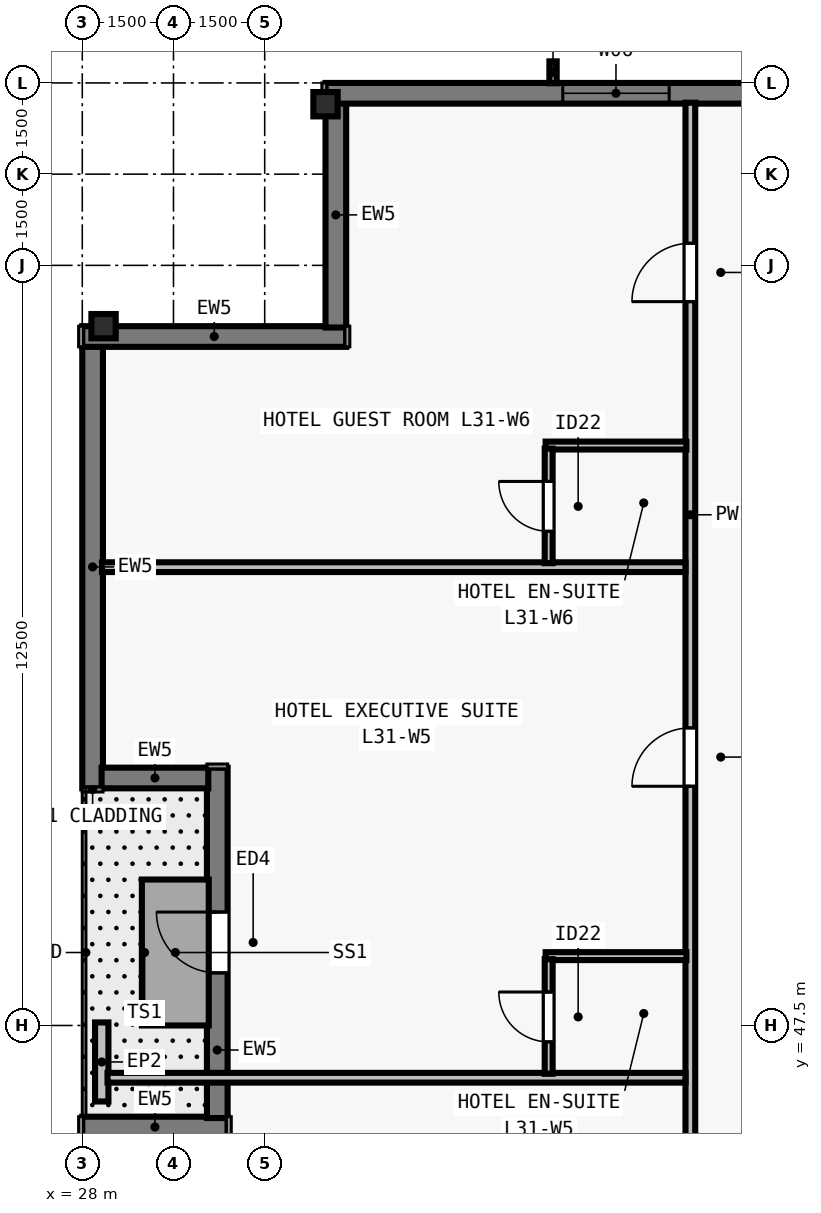
"""IFC4 building model, lengths in metres.
Left out: names, types, materials, properties, quantities, classifications, styles, units other than length and angle.
Written with IfcOpenShell. Run it as: python <this file> out.ifc"""

import sys

from ifc_helpers import new_model, si_unit, direction, frame, frame_2d, origin, origin_2d, place, context, subcontext, project, spatial, rectangle, i_section, extrude, element, fill, save


model = new_model("IFC4")
c1 = context("Model", 3, precision=1e-05, world=origin(), true_north=direction((0.0, 1.0)))
c2 = subcontext(c1, "Body", "Model", "MODEL_VIEW")
j1 = project(units=[si_unit("LENGTHUNIT", "METRE"), si_unit("PLANEANGLEUNIT", "RADIAN")], contexts=[c1])
p1 = place(None, origin())
s1 = spatial("IfcSite", under=j1, at=p1, CompositionType="ELEMENT")
p2 = place(p1, origin())
s2 = spatial("IfcBuilding", under=s1, at=p2, CompositionType="ELEMENT")
p3 = place(p2, frame((0.0, 0.0, 116.5)))
s3 = spatial("IfcBuildingStorey", under=s2, at=p3, CompositionType="ELEMENT", Elevation=116.5)
for number, where, z_axis, x_axis in (
    (1, (32.0, 62.65, 0.0), (0.0, 0.0, 1.0), (1.0, 0.0, 0.0)),
    (2, (28.35, 59.0, 0.0), (0.0, 0.0, 1.0), (0.0, 1.0, 0.0)),
):
    element("IfcColumn", number, at=place(p3, frame(where, z_axis=z_axis, x_axis=x_axis)), inside=s3, PredefinedType="COLUMN", context=c2, shape_type="SweptSolid", body=[
        extrude(i_section(OverallWidth=0.4, OverallDepth=0.4, WebThickness=0.022, FlangeThickness=0.036, at=origin_2d()), origin(), (0.0, 0.0, 1.0), 3.5),
    ])
p4 = place(p3, frame((28.17, 51.4, 0.0), z_axis=(0.0, 0.0, 1.0), x_axis=(0.0, 1.0, 0.0)))
e3 = element("IfcWall", 3, at=p4, inside=s3, PredefinedType="SOLIDWALL", context=c2, shape_type="SweptSolid", body=[
    extrude(rectangle(XDim=7.282, YDim=0.34, at=frame_2d((3.641, 0.0))), origin(), (0.0, 0.0, 1.0), 3.28),
])
p5 = place(p3, frame((28.0, 58.83, 0.0), z_axis=(0.0, 0.0, 1.0), x_axis=(1.0, 0.0, 0.0)))
e4 = element("IfcWall", 4, at=p5, inside=s3, PredefinedType="SOLIDWALL", context=c2, shape_type="SweptSolid", body=[
    extrude(rectangle(XDim=4.34, YDim=0.34, at=frame_2d((2.17, 0.0))), origin(), (0.0, 0.0, 1.0), 3.28),
])
p6 = place(p3, frame((32.17, 58.978, 0.0), z_axis=(0.0, 0.0, 1.0), x_axis=(0.0, 1.0, 0.0)))
e5 = element("IfcWall", 5, at=p6, inside=s3, PredefinedType="SOLIDWALL", context=c2, shape_type="SweptSolid", body=[
    extrude(rectangle(XDim=3.704, YDim=0.34, at=frame_2d((1.852, 0.0))), origin(), (0.0, 0.0, 1.0), 3.28),
])
p7 = place(p3, frame((32.0, 62.83, 0.0), z_axis=(0.0, 0.0, 1.0), x_axis=(1.0, 0.0, 0.0)))
e6 = element("IfcWall", 6, at=p7, inside=s3, PredefinedType="SOLIDWALL", context=c2, shape_type="SweptSolid", body=[
    extrude(rectangle(XDim=39.682, YDim=0.34, at=frame_2d((19.841, 0.0))), origin(), (0.0, 0.0, 1.0), 3.28),
])
p8 = place(p7, frame((3.902, 0.0, 0.8)))
e7 = element("IfcOpeningElement", 7, at=p8, cuts=e6, PredefinedType="OPENING", context=c2, shape_type="SweptSolid", body=[
    extrude(rectangle(XDim=1.75, YDim=1.66, at=frame_2d((0.875, 0.83))), frame((0.0, 0.18, 0.0), z_axis=(0.0, -1.0, 0.0), x_axis=(1.0, 0.0, 0.0)), (0.0, 0.0, 1.0), 0.36),
])
p9 = place(p7, frame((8.505, 0.0, 0.8)))
e8 = element("IfcOpeningElement", 8, at=p9, cuts=e6, PredefinedType="OPENING", context=c2, shape_type="SweptSolid", body=[
    extrude(rectangle(XDim=1.35, YDim=1.66, at=frame_2d((0.675, 0.83))), frame((0.0, 0.18, 0.0), z_axis=(0.0, -1.0, 0.0), x_axis=(1.0, 0.0, 0.0)), (0.0, 0.0, 1.0), 0.36),
])
p10 = place(p7, frame((11.859, 0.0, 0.8)))
e9 = element("IfcOpeningElement", 9, at=p10, cuts=e6, PredefinedType="OPENING", context=c2, shape_type="SweptSolid", body=[
    extrude(rectangle(XDim=1.75, YDim=1.66, at=frame_2d((0.875, 0.83))), frame((0.0, 0.18, 0.0), z_axis=(0.0, -1.0, 0.0), x_axis=(1.0, 0.0, 0.0)), (0.0, 0.0, 1.0), 0.36),
])
p11 = place(p7, frame((16.062, 0.0, 0.8)))
e10 = element("IfcOpeningElement", 10, at=p11, cuts=e6, PredefinedType="OPENING", context=c2, shape_type="SweptSolid", body=[
    extrude(rectangle(XDim=1.35, YDim=1.66, at=frame_2d((0.675, 0.83))), frame((0.0, 0.18, 0.0), z_axis=(0.0, -1.0, 0.0), x_axis=(1.0, 0.0, 0.0)), (0.0, 0.0, 1.0), 0.36),
])
p12 = place(p7, frame((17.716, 0.0, 0.8)))
e11 = element("IfcOpeningElement", 11, at=p12, cuts=e6, PredefinedType="OPENING", context=c2, shape_type="SweptSolid", body=[
    extrude(rectangle(XDim=1.75, YDim=1.66, at=frame_2d((0.875, 0.83))), frame((0.0, 0.18, 0.0), z_axis=(0.0, -1.0, 0.0), x_axis=(1.0, 0.0, 0.0)), (0.0, 0.0, 1.0), 0.36),
])
p13 = place(p7, frame((22.719, 0.0, 0.8)))
e12 = element("IfcOpeningElement", 12, at=p13, cuts=e6, PredefinedType="OPENING", context=c2, shape_type="SweptSolid", body=[
    extrude(rectangle(XDim=1.35, YDim=1.66, at=frame_2d((0.675, 0.83))), frame((0.0, 0.18, 0.0), z_axis=(0.0, -1.0, 0.0), x_axis=(1.0, 0.0, 0.0)), (0.0, 0.0, 1.0), 0.36),
])
p14 = place(p7, frame((26.073, 0.0, 0.8)))
e13 = element("IfcOpeningElement", 13, at=p14, cuts=e6, PredefinedType="OPENING", context=c2, shape_type="SweptSolid", body=[
    extrude(rectangle(XDim=1.75, YDim=1.66, at=frame_2d((0.875, 0.83))), frame((0.0, 0.18, 0.0), z_axis=(0.0, -1.0, 0.0), x_axis=(1.0, 0.0, 0.0)), (0.0, 0.0, 1.0), 0.36),
])
p15 = place(p7, frame((30.677, 0.0, 0.8)))
e14 = element("IfcOpeningElement", 14, at=p15, cuts=e6, PredefinedType="OPENING", context=c2, shape_type="SweptSolid", body=[
    extrude(rectangle(XDim=1.35, YDim=1.66, at=frame_2d((0.675, 0.83))), frame((0.0, 0.18, 0.0), z_axis=(0.0, -1.0, 0.0), x_axis=(1.0, 0.0, 0.0)), (0.0, 0.0, 1.0), 0.36),
])
p16 = place(p7, frame((33.18, 0.0, 0.8)))
e15 = element("IfcOpeningElement", 15, at=p16, cuts=e6, PredefinedType="OPENING", context=c2, shape_type="SweptSolid", body=[
    extrude(rectangle(XDim=1.75, YDim=1.66, at=frame_2d((0.875, 0.83))), frame((0.0, 0.18, 0.0), z_axis=(0.0, -1.0, 0.0), x_axis=(1.0, 0.0, 0.0)), (0.0, 0.0, 1.0), 0.36),
])
p17 = place(p3, frame((28.0, 45.83, 0.0), z_axis=(0.0, 0.0, 1.0), x_axis=(1.0, 0.0, 0.0)))
e16 = element("IfcWall", 16, at=p17, inside=s3, PredefinedType="SOLIDWALL", context=c2, shape_type="SweptSolid", body=[
    extrude(rectangle(XDim=2.39, YDim=0.34, at=frame_2d((1.195, 0.0))), origin(), (0.0, 0.0, 1.0), 3.28),
])
p18 = place(p3, frame((30.22, 45.978, 0.0), z_axis=(0.0, 0.0, 1.0), x_axis=(0.0, 1.0, 0.0)))
e17 = element("IfcWall", 17, at=p18, inside=s3, PredefinedType="SOLIDWALL", context=c2, shape_type="SweptSolid", body=[
    extrude(rectangle(XDim=5.762, YDim=0.34, at=frame_2d((2.881, 0.0))), origin(), (0.0, 0.0, 1.0), 3.28),
])
p19 = place(p18, frame((2.387, 0.0, 0.0)))
e18 = element("IfcOpeningElement", 18, at=p19, cuts=e17, PredefinedType="OPENING", context=c2, shape_type="SweptSolid", body=[
    extrude(rectangle(XDim=1.0, YDim=2.15, at=frame_2d((0.5, 1.075))), frame((0.0, 0.18, 0.0), z_axis=(0.0, -1.0, 0.0), x_axis=(1.0, 0.0, 0.0)), (0.0, 0.0, 1.0), 0.36),
])
p20 = place(p3, frame((30.072, 51.57, 0.0), z_axis=(0.0, 0.0, 1.0), x_axis=(-1.0, 0.0, 0.0)))
e19 = element("IfcWall", 19, at=p20, inside=s3, PredefinedType="SOLIDWALL", context=c2, shape_type="SweptSolid", body=[
    extrude(rectangle(XDim=1.754, YDim=0.34, at=frame_2d((0.877, 0.0))), origin(), (0.0, 0.0, 1.0), 3.28),
])
p21 = place(p3, frame((28.32, 46.25, 0.0), z_axis=(0.0, 0.0, 1.0), x_axis=(0.0, 1.0, 0.0)))
e20 = element("IfcWall", 20, at=p21, inside=s3, PredefinedType="PARAPET", context=c2, shape_type="SweptSolid", body=[
    extrude(rectangle(XDim=1.3, YDim=0.22, at=frame_2d((0.65, 0.0))), origin(), (0.0, 0.0, 1.0), 0.55),
])
p22 = place(p3, frame((38.0, 15.325, 0.0), z_axis=(0.0, 0.0, 1.0), x_axis=(0.0, 1.0, 0.0)))
e21 = element("IfcWall", 21, at=p22, inside=s3, PredefinedType="PARTITIONING", context=c2, shape_type="SweptSolid", body=[
    extrude(rectangle(XDim=47.35, YDim=0.16, at=frame_2d((23.675, 0.0))), origin(), (0.0, 0.0, 1.0), 2.555),
])
p23 = place(p22, frame((5.003, 0.0, 0.0)))
e22 = element("IfcOpeningElement", 22, at=p23, cuts=e21, PredefinedType="OPENING", context=c2, shape_type="SweptSolid", body=[
    extrude(rectangle(XDim=0.96, YDim=2.15, at=frame_2d((0.48, 1.075))), frame((0.0, 0.09, 0.0), z_axis=(0.0, -1.0, 0.0), x_axis=(1.0, 0.0, 0.0)), (0.0, 0.0, 1.0), 0.18),
])
p24 = place(p22, frame((12.529, 0.0, 0.0)))
e23 = element("IfcOpeningElement", 23, at=p24, cuts=e21, PredefinedType="OPENING", context=c2, shape_type="SweptSolid", body=[
    extrude(rectangle(XDim=0.96, YDim=2.15, at=frame_2d((0.48, 1.075))), frame((0.0, 0.09, 0.0), z_axis=(0.0, -1.0, 0.0), x_axis=(1.0, 0.0, 0.0)), (0.0, 0.0, 1.0), 0.18),
])
p25 = place(p22, frame((20.389, 0.0, 0.0)))
e24 = element("IfcOpeningElement", 24, at=p25, cuts=e21, PredefinedType="OPENING", context=c2, shape_type="SweptSolid", body=[
    extrude(rectangle(XDim=0.96, YDim=2.15, at=frame_2d((0.48, 1.075))), frame((0.0, 0.09, 0.0), z_axis=(0.0, -1.0, 0.0), x_axis=(1.0, 0.0, 0.0)), (0.0, 0.0, 1.0), 0.18),
])
p26 = place(p22, frame((28.249, 0.0, 0.0)))
e25 = element("IfcOpeningElement", 25, at=p26, cuts=e21, PredefinedType="OPENING", context=c2, shape_type="SweptSolid", body=[
    extrude(rectangle(XDim=0.96, YDim=2.15, at=frame_2d((0.48, 1.075))), frame((0.0, 0.09, 0.0), z_axis=(0.0, -1.0, 0.0), x_axis=(1.0, 0.0, 0.0)), (0.0, 0.0, 1.0), 0.18),
])
p27 = place(p22, frame((36.109, 0.0, 0.0)))
e26 = element("IfcOpeningElement", 26, at=p27, cuts=e21, PredefinedType="OPENING", context=c2, shape_type="SweptSolid", body=[
    extrude(rectangle(XDim=0.96, YDim=2.15, at=frame_2d((0.48, 1.075))), frame((0.0, 0.09, 0.0), z_axis=(0.0, -1.0, 0.0), x_axis=(1.0, 0.0, 0.0)), (0.0, 0.0, 1.0), 0.18),
])
p28 = place(p22, frame((44.079, 0.0, 0.0)))
e27 = element("IfcOpeningElement", 27, at=p28, cuts=e21, PredefinedType="OPENING", context=c2, shape_type="SweptSolid", body=[
    extrude(rectangle(XDim=0.96, YDim=2.15, at=frame_2d((0.48, 1.075))), frame((0.0, 0.09, 0.0), z_axis=(0.0, -1.0, 0.0), x_axis=(1.0, 0.0, 0.0)), (0.0, 0.0, 1.0), 0.18),
])
p29 = place(p3, frame((28.415, 46.641, 0.0), z_axis=(0.0, 0.0, 1.0), x_axis=(1.0, 0.0, 0.0)))
e28 = element("IfcWall", 28, at=p29, inside=s3, PredefinedType="PARTITIONING", context=c2, shape_type="SweptSolid", body=[
    extrude(rectangle(XDim=9.505, YDim=0.16, at=frame_2d((4.752, 0.0))), origin(), (0.0, 0.0, 1.0), 3.28),
])
p30 = place(p3, frame((35.62, 48.641, 0.0), z_axis=(0.0, 0.0, 1.0), x_axis=(1.0, 0.0, 0.0)))
e29 = element("IfcWall", 29, at=p30, inside=s3, PredefinedType="PLUMBINGWALL", context=c2, shape_type="SweptSolid", body=[
    extrude(rectangle(XDim=2.315, YDim=0.13, at=frame_2d((1.157, 0.0))), origin(), (0.0, 0.0, 1.0), 3.28),
])
p31 = place(p3, frame((35.67, 46.706, 0.0), z_axis=(0.0, 0.0, 1.0), x_axis=(0.0, 1.0, 0.0)))
e30 = element("IfcWall", 30, at=p31, inside=s3, PredefinedType="PLUMBINGWALL", context=c2, shape_type="SweptSolid", body=[
    extrude(rectangle(XDim=1.885, YDim=0.13, at=frame_2d((0.942, 0.0))), origin(), (0.0, 0.0, 1.0), 3.28),
])
p32 = place(p31, frame((0.525, 0.0, 0.0)))
e31 = element("IfcOpeningElement", 31, at=p32, cuts=e30, PredefinedType="OPENING", context=c2, shape_type="SweptSolid", body=[
    extrude(rectangle(XDim=0.82, YDim=2.1, at=frame_2d((0.41, 1.05))), frame((0.0, 0.075, 0.0), z_axis=(0.0, -1.0, 0.0), x_axis=(1.0, 0.0, 0.0)), (0.0, 0.0, 1.0), 0.15),
])
p33 = place(p3, frame((28.325, 55.037, 0.0), z_axis=(0.0, 0.0, 1.0), x_axis=(1.0, 0.0, 0.0)))
e32 = element("IfcWall", 32, at=p33, inside=s3, PredefinedType="PARTITIONING", context=c2, shape_type="SweptSolid", body=[
    extrude(rectangle(XDim=9.595, YDim=0.16, at=frame_2d((4.797, 0.0))), origin(), (0.0, 0.0, 1.0), 2.896),
])
p34 = place(p3, frame((35.62, 57.037, 0.0), z_axis=(0.0, 0.0, 1.0), x_axis=(1.0, 0.0, 0.0)))
e33 = element("IfcWall", 33, at=p34, inside=s3, PredefinedType="PLUMBINGWALL", context=c2, shape_type="SweptSolid", body=[
    extrude(rectangle(XDim=2.315, YDim=0.13, at=frame_2d((1.157, 0.0))), origin(), (0.0, 0.0, 1.0), 3.28),
])
p35 = place(p3, frame((35.67, 55.102, 0.0), z_axis=(0.0, 0.0, 1.0), x_axis=(0.0, 1.0, 0.0)))
e34 = element("IfcWall", 34, at=p35, inside=s3, PredefinedType="PLUMBINGWALL", context=c2, shape_type="SweptSolid", body=[
    extrude(rectangle(XDim=1.885, YDim=0.13, at=frame_2d((0.942, 0.0))), origin(), (0.0, 0.0, 1.0), 3.28),
])
p36 = place(p35, frame((0.525, 0.0, 0.0)))
e35 = element("IfcOpeningElement", 35, at=p36, cuts=e34, PredefinedType="OPENING", context=c2, shape_type="SweptSolid", body=[
    extrude(rectangle(XDim=0.82, YDim=2.1, at=frame_2d((0.41, 1.05))), frame((0.0, 0.075, 0.0), z_axis=(0.0, -1.0, 0.0), x_axis=(1.0, 0.0, 0.0)), (0.0, 0.0, 1.0), 0.15),
])
p37 = place(p8, origin())
e36 = element("IfcWindow", 36, at=p37, inside=s3, PartitioningType="SINGLE_PANEL", PredefinedType="WINDOW", context=c2, shape_type="SweptSolid", body=[
    extrude(rectangle(XDim=1.75, YDim=1.66, at=frame_2d((0.875, 0.83))), frame((0.0, -0.05, 0.0), z_axis=(0.0, -1.0, 0.0), x_axis=(1.0, 0.0, 0.0)), (0.0, 0.0, 1.0), 0.06),
])
fill(e7, e36)
p38 = place(p19, origin())
e37 = element("IfcDoor", 37, at=p38, inside=s3, OperationType="SINGLE_SWING_RIGHT", PredefinedType="DOOR", context=c2, shape_type="SweptSolid", body=[
    extrude(rectangle(XDim=1.0, YDim=2.15, at=frame_2d((0.5, 1.075))), frame((0.0, 0.025, 0.0), z_axis=(0.0, -1.0, 0.0), x_axis=(1.0, 0.0, 0.0)), (0.0, 0.0, 1.0), 0.05),
])
fill(e18, e37)
p39 = place(p32, origin())
e38 = element("IfcDoor", 38, at=p39, inside=s3, OperationType="SINGLE_SWING_RIGHT", PredefinedType="DOOR", context=c2, shape_type="SweptSolid", body=[
    extrude(rectangle(XDim=0.82, YDim=2.1, at=frame_2d((0.41, 1.05))), frame((0.0, 0.025, 0.0), z_axis=(0.0, -1.0, 0.0), x_axis=(1.0, 0.0, 0.0)), (0.0, 0.0, 1.0), 0.05),
])
fill(e31, e38)
p40 = place(p27, origin())
e39 = element("IfcDoor", 39, at=p40, inside=s3, OperationType="SINGLE_SWING_LEFT", PredefinedType="DOOR", context=c2, shape_type="SweptSolid", body=[
    extrude(rectangle(XDim=0.96, YDim=2.15, at=frame_2d((0.48, 1.075))), frame((0.0, 0.025, 0.0), z_axis=(0.0, -1.0, 0.0), x_axis=(1.0, 0.0, 0.0)), (0.0, 0.0, 1.0), 0.05),
])
fill(e26, e39)
p41 = place(p36, origin())
e40 = element("IfcDoor", 40, at=p41, inside=s3, OperationType="SINGLE_SWING_RIGHT", PredefinedType="DOOR", context=c2, shape_type="SweptSolid", body=[
    extrude(rectangle(XDim=0.82, YDim=2.1, at=frame_2d((0.41, 1.05))), frame((0.0, 0.025, 0.0), z_axis=(0.0, -1.0, 0.0), x_axis=(1.0, 0.0, 0.0)), (0.0, 0.0, 1.0), 0.05),
])
fill(e35, e40)
p42 = place(p28, origin())
e41 = element("IfcDoor", 41, at=p42, inside=s3, OperationType="SINGLE_SWING_LEFT", PredefinedType="DOOR", context=c2, shape_type="SweptSolid", body=[
    extrude(rectangle(XDim=0.96, YDim=2.15, at=frame_2d((0.48, 1.075))), frame((0.0, 0.025, 0.0), z_axis=(0.0, -1.0, 0.0), x_axis=(1.0, 0.0, 0.0)), (0.0, 0.0, 1.0), 0.05),
])
fill(e27, e41)
save(model, sys.argv[1])
